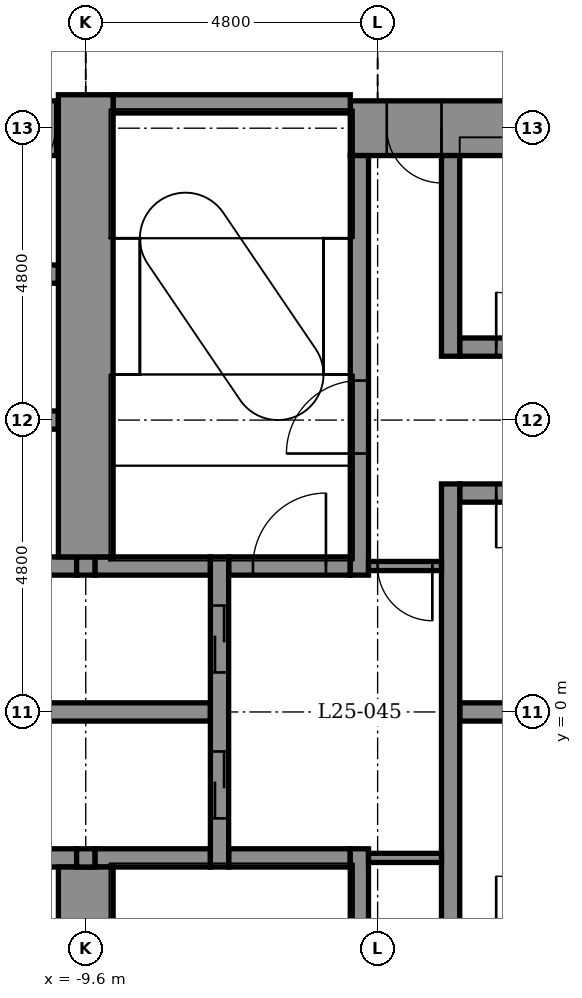
"""IFC4 building model, lengths in metres.
Left out: names, types, materials, properties, quantities, classifications, styles, units other than length and angle.
Written with IfcOpenShell. Run it as: python <this file> out.ifc"""

import sys

from ifc_helpers import new_model, si_unit, direction, frame, frame_2d, origin, place, context, subcontext, project, spatial, rectangle, extrude, element, fill, save


model = new_model("IFC4")
c1 = context("Model", 3, precision=1e-05, world=origin(), true_north=direction((0.0, 1.0)))
c2 = subcontext(c1, "Body", "Model", "MODEL_VIEW")
j1 = project(units=[si_unit("LENGTHUNIT", "METRE"), si_unit("PLANEANGLEUNIT", "RADIAN")], contexts=[c1])
p1 = place(None, origin())
s1 = spatial("IfcSite", under=j1, at=p1, CompositionType="ELEMENT")
p2 = place(p1, origin())
s2 = spatial("IfcBuilding", under=s1, at=p2, CompositionType="ELEMENT")
p3 = place(p2, frame((0.0, 0.0, 127.4)))
s3 = spatial("IfcBuildingStorey", under=s2, at=p3, CompositionType="ELEMENT", Elevation=127.4)
p4 = place(p3, frame((-10.85, -2.4, -0.3), z_axis=(0.0, 0.0, 1.0), x_axis=(1.0, 0.0, 0.0)))
e1 = element("IfcWall", 1, at=p4, inside=s3, PredefinedType="STANDARD", context=c2, shape_type="SweptSolid", body=[
    extrude(rectangle(XDim=1.1, YDim=0.3, at=frame_2d((0.55, 0.0))), origin(), (0.0, 0.0, 1.0), 6.15),
])
p5 = place(p3, frame((-9.45, -2.4, -0.3), z_axis=(0.0, 0.0, 1.0), x_axis=(1.0, 0.0, 0.0)))
e2 = element("IfcWall", 2, at=p5, inside=s3, PredefinedType="STANDARD", context=c2, shape_type="SweptSolid", body=[
    extrude(rectangle(XDim=1.9, YDim=0.3, at=frame_2d((0.95, 0.0))), origin(), (0.0, 0.0, 1.0), 6.15),
])
p6 = place(p3, frame((-7.25, -2.4, -0.3), z_axis=(0.0, 0.0, 1.0), x_axis=(1.0, 0.0, 0.0)))
e3 = element("IfcWall", 3, at=p6, inside=s3, PredefinedType="STANDARD", context=c2, shape_type="SweptSolid", body=[
    extrude(rectangle(XDim=2.0, YDim=0.3, at=frame_2d((1.0, 0.0))), origin(), (0.0, 0.0, 1.0), 6.15),
])
p7 = place(p3, frame((-10.85, 0.0, -0.3), z_axis=(0.0, 0.0, 1.0), x_axis=(1.0, 0.0, 0.0)))
e4 = element("IfcWall", 4, at=p7, inside=s3, PredefinedType="STANDARD", context=c2, shape_type="SweptSolid", body=[
    extrude(rectangle(XDim=3.3, YDim=0.3, at=frame_2d((1.65, 0.0))), origin(), (0.0, 0.0, 1.0), 6.15),
])
p8 = place(p3, frame((-3.45, 0.0, -0.3), z_axis=(0.0, 0.0, 1.0), x_axis=(1.0, 0.0, 0.0)))
e5 = element("IfcWall", 5, at=p8, inside=s3, PredefinedType="STANDARD", context=c2, shape_type="SweptSolid", body=[
    extrude(rectangle(XDim=2.1, YDim=0.3, at=frame_2d((1.05, 0.0))), origin(), (0.0, 0.0, 1.0), 6.15),
])
p9 = place(p3, frame((-10.85, 2.4, -0.3), z_axis=(0.0, 0.0, 1.0), x_axis=(1.0, 0.0, 0.0)))
e6 = element("IfcWall", 6, at=p9, inside=s3, PredefinedType="STANDARD", context=c2, shape_type="SweptSolid", body=[
    extrude(rectangle(XDim=1.1, YDim=0.3, at=frame_2d((0.55, 0.0))), origin(), (0.0, 0.0, 1.0), 6.15),
])
p10 = place(p3, frame((-9.45, 2.4, -0.3), z_axis=(0.0, 0.0, 1.0), x_axis=(1.0, 0.0, 0.0)))
e7 = element("IfcWall", 7, at=p10, inside=s3, PredefinedType="STANDARD", context=c2, shape_type="SweptSolid", body=[
    extrude(rectangle(XDim=1.9, YDim=0.3, at=frame_2d((0.95, 0.0))), origin(), (0.0, 0.0, 1.0), 6.15),
])
p11 = place(p3, frame((-7.25, 2.4, -0.3), z_axis=(0.0, 0.0, 1.0), x_axis=(1.0, 0.0, 0.0)))
e8 = element("IfcWall", 8, at=p11, inside=s3, PredefinedType="STANDARD", context=c2, shape_type="SweptSolid", body=[
    extrude(rectangle(XDim=2.0, YDim=0.3, at=frame_2d((1.0, 0.0))), origin(), (0.0, 0.0, 1.0), 6.15),
])
p12 = place(p11, frame((0.4, 0.0, 0.3)))
e9 = element("IfcOpeningElement", 9, at=p12, cuts=e8, PredefinedType="OPENING", context=c2, shape_type="SweptSolid", body=[
    extrude(rectangle(XDim=1.2, YDim=2.1, at=frame_2d((0.6, 1.05))), frame((0.0, 0.16, 0.0), z_axis=(0.0, -1.0, 0.0), x_axis=(1.0, 0.0, 0.0)), (0.0, 0.0, 1.0), 0.32),
])
p13 = place(p3, frame((-3.45, 3.6, -0.3), z_axis=(0.0, 0.0, 1.0), x_axis=(1.0, 0.0, 0.0)))
e10 = element("IfcWall", 10, at=p13, inside=s3, PredefinedType="STANDARD", context=c2, shape_type="SweptSolid", body=[
    extrude(rectangle(XDim=2.1, YDim=0.3, at=frame_2d((1.05, 0.0))), origin(), (0.0, 0.0, 1.0), 6.15),
])
p14 = place(p13, frame((0.6, 0.0, 0.3)))
e11 = element("IfcOpeningElement", 11, at=p14, cuts=e10, PredefinedType="OPENING", context=c2, shape_type="SweptSolid", body=[
    extrude(rectangle(XDim=0.9, YDim=2.1, at=frame_2d((0.45, 1.05))), frame((0.0, 0.16, 0.0), z_axis=(0.0, -1.0, 0.0), x_axis=(1.0, 0.0, 0.0)), (0.0, 0.0, 1.0), 0.32),
])
p15 = place(p3, frame((-13.95, 4.8, -0.3), z_axis=(0.0, 0.0, 1.0), x_axis=(1.0, 0.0, 0.0)))
e12 = element("IfcWall", 12, at=p15, inside=s3, PredefinedType="STANDARD", context=c2, shape_type="SweptSolid", body=[
    extrude(rectangle(XDim=3.9, YDim=0.3, at=frame_2d((1.95, 0.0))), origin(), (0.0, 0.0, 1.0), 6.15),
])
p16 = place(p3, frame((-3.45, 6.0, -0.3), z_axis=(0.0, 0.0, 1.0), x_axis=(1.0, 0.0, 0.0)))
e13 = element("IfcWall", 13, at=p16, inside=s3, PredefinedType="STANDARD", context=c2, shape_type="SweptSolid", body=[
    extrude(rectangle(XDim=2.1, YDim=0.3, at=frame_2d((1.05, 0.0))), origin(), (0.0, 0.0, 1.0), 6.15),
])
p17 = place(p16, frame((0.6, 0.0, 0.3)))
e14 = element("IfcOpeningElement", 14, at=p17, cuts=e13, PredefinedType="OPENING", context=c2, shape_type="SweptSolid", body=[
    extrude(rectangle(XDim=0.9, YDim=2.1, at=frame_2d((0.45, 1.05))), frame((0.0, 0.16, 0.0), z_axis=(0.0, -1.0, 0.0), x_axis=(1.0, 0.0, 0.0)), (0.0, 0.0, 1.0), 0.32),
])
p18 = place(p3, frame((-13.95, 7.2, -0.3), z_axis=(0.0, 0.0, 1.0), x_axis=(1.0, 0.0, 0.0)))
e15 = element("IfcWall", 15, at=p18, inside=s3, PredefinedType="STANDARD", context=c2, shape_type="SweptSolid", body=[
    extrude(rectangle(XDim=3.9, YDim=0.3, at=frame_2d((1.95, 0.0))), origin(), (0.0, 0.0, 1.0), 6.15),
])
p19 = place(p3, frame((-13.95, 9.6, -0.3), z_axis=(0.0, 0.0, 1.0), x_axis=(1.0, 0.0, 0.0)))
e16 = element("IfcWall", 16, at=p19, inside=s3, PredefinedType="SHEAR", context=c2, shape_type="SweptSolid", body=[
    extrude(rectangle(XDim=3.9, YDim=0.9, at=frame_2d((1.95, 0.0))), origin(), (0.0, 0.0, 1.0), 6.15),
])
p20 = place(p19, frame((0.05, 0.0, 0.3)))
e17 = element("IfcOpeningElement", 17, at=p20, cuts=e16, PredefinedType="OPENING", context=c2, shape_type="SweptSolid", body=[
    extrude(rectangle(XDim=0.9, YDim=2.1, at=frame_2d((0.45, 1.05))), frame((0.0, 0.46, 0.0), z_axis=(0.0, -1.0, 0.0), x_axis=(1.0, 0.0, 0.0)), (0.0, 0.0, 1.0), 0.92),
])
p21 = place(p19, frame((1.5, 0.0, 0.3)))
e18 = element("IfcOpeningElement", 18, at=p21, cuts=e16, PredefinedType="OPENING", context=c2, shape_type="SweptSolid", body=[
    extrude(rectangle(XDim=0.9, YDim=2.1, at=frame_2d((0.45, 1.05))), frame((0.0, 0.46, 0.0), z_axis=(0.0, -1.0, 0.0), x_axis=(1.0, 0.0, 0.0)), (0.0, 0.0, 1.0), 0.92),
])
p22 = place(p19, frame((2.95, 0.0, 0.3)))
e19 = element("IfcOpeningElement", 19, at=p22, cuts=e16, PredefinedType="OPENING", context=c2, shape_type="SweptSolid", body=[
    extrude(rectangle(XDim=0.9, YDim=2.1, at=frame_2d((0.45, 1.05))), frame((0.0, 0.46, 0.0), z_axis=(0.0, -1.0, 0.0), x_axis=(1.0, 0.0, 0.0)), (0.0, 0.0, 1.0), 0.92),
])
p23 = place(p3, frame((-5.25, 9.6, -0.3), z_axis=(0.0, 0.0, 1.0), x_axis=(1.0, 0.0, 0.0)))
e20 = element("IfcWall", 20, at=p23, inside=s3, PredefinedType="SHEAR", context=c2, shape_type="SweptSolid", body=[
    extrude(rectangle(XDim=14.4, YDim=0.9, at=frame_2d((7.2, 0.0))), origin(), (0.0, 0.0, 1.0), 6.15),
])
p24 = place(p23, frame((0.6, 0.0, 0.3)))
e21 = element("IfcOpeningElement", 21, at=p24, cuts=e20, PredefinedType="OPENING", context=c2, shape_type="SweptSolid", body=[
    extrude(rectangle(XDim=0.9, YDim=2.1, at=frame_2d((0.45, 1.05))), frame((0.0, 0.46, 0.0), z_axis=(0.0, -1.0, 0.0), x_axis=(1.0, 0.0, 0.0)), (0.0, 0.0, 1.0), 0.92),
])
p25 = place(p3, frame((-9.15, 10.0, -0.3), z_axis=(0.0, 0.0, 1.0), x_axis=(1.0, 0.0, 0.0)))
e22 = element("IfcWall", 22, at=p25, inside=s3, PredefinedType="STANDARD", context=c2, shape_type="SweptSolid", body=[
    extrude(rectangle(XDim=3.9, YDim=0.3, at=frame_2d((1.95, 0.0))), origin(), (0.0, 0.0, 1.0), 6.15),
])
p26 = place(p3, frame((-9.6, -10.15, -0.3), z_axis=(0.0, 0.0, 1.0), x_axis=(0.0, 1.0, 0.0)))
e23 = element("IfcWall", 23, at=p26, inside=s3, PredefinedType="SHEAR", context=c2, shape_type="SweptSolid", body=[
    extrude(rectangle(XDim=7.6, YDim=0.9, at=frame_2d((3.8, 0.0))), origin(), (0.0, 0.0, 1.0), 6.15),
])
for number, where, z_axis, x_axis in (
    (24, (-9.6, -2.55, -0.3), (0.0, 0.0, 1.0), (0.0, 1.0, 0.0)),
    (25, (-9.6, 2.25, -0.3), (0.0, 0.0, 1.0), (0.0, 1.0, 0.0)),
):
    element("IfcWall", number, at=place(p3, frame(where, z_axis=z_axis, x_axis=x_axis)), inside=s3, PredefinedType="STANDARD", context=c2, shape_type="SweptSolid", body=[
        extrude(rectangle(XDim=0.3, YDim=0.3, at=frame_2d((0.15, 0.0))), origin(), (0.0, 0.0, 1.0), 6.15),
    ])
p27 = place(p3, frame((-9.6, 2.55, -0.3), z_axis=(0.0, 0.0, 1.0), x_axis=(0.0, 1.0, 0.0)))
e26 = element("IfcWall", 26, at=p27, inside=s3, PredefinedType="SHEAR", context=c2, shape_type="SweptSolid", body=[
    extrude(rectangle(XDim=7.6, YDim=0.9, at=frame_2d((3.8, 0.0))), origin(), (0.0, 0.0, 1.0), 6.15),
])
p28 = place(p3, frame((-7.4, -2.55, -0.3), z_axis=(0.0, 0.0, 1.0), x_axis=(0.0, 1.0, 0.0)))
e27 = element("IfcWall", 27, at=p28, inside=s3, PredefinedType="STANDARD", context=c2, shape_type="SweptSolid", body=[
    extrude(rectangle(XDim=5.1, YDim=0.3, at=frame_2d((2.55, 0.0))), origin(), (0.0, 0.0, 1.0), 6.15),
])
p29 = place(p28, frame((0.8, 0.0, 0.3)))
e28 = element("IfcOpeningElement", 28, at=p29, cuts=e27, PredefinedType="OPENING", context=c2, shape_type="SweptSolid", body=[
    extrude(rectangle(XDim=1.1, YDim=2.1, at=frame_2d((0.55, 1.05))), frame((0.0, 0.16, 0.0), z_axis=(0.0, -1.0, 0.0), x_axis=(1.0, 0.0, 0.0)), (0.0, 0.0, 1.0), 0.32),
])
p30 = place(p28, frame((3.2, 0.0, 0.3)))
e29 = element("IfcOpeningElement", 29, at=p30, cuts=e27, PredefinedType="OPENING", context=c2, shape_type="SweptSolid", body=[
    extrude(rectangle(XDim=1.1, YDim=2.1, at=frame_2d((0.55, 1.05))), frame((0.0, 0.16, 0.0), z_axis=(0.0, -1.0, 0.0), x_axis=(1.0, 0.0, 0.0)), (0.0, 0.0, 1.0), 0.32),
])
p31 = place(p3, frame((-5.1, -9.15, -0.3), z_axis=(0.0, 0.0, 1.0), x_axis=(0.0, 1.0, 0.0)))
e30 = element("IfcWall", 30, at=p31, inside=s3, PredefinedType="STANDARD", context=c2, shape_type="SweptSolid", body=[
    extrude(rectangle(XDim=6.9, YDim=0.3, at=frame_2d((3.45, 0.0))), origin(), (0.0, 0.0, 1.0), 6.15),
])
p32 = place(p31, frame((3.7, 0.0, 0.3)))
e31 = element("IfcOpeningElement", 31, at=p32, cuts=e30, PredefinedType="OPENING", context=c2, shape_type="SweptSolid", body=[
    extrude(rectangle(XDim=1.2, YDim=2.1, at=frame_2d((0.6, 1.05))), frame((0.0, 0.16, 0.0), z_axis=(0.0, -1.0, 0.0), x_axis=(1.0, 0.0, 0.0)), (0.0, 0.0, 1.0), 0.32),
])
p33 = place(p3, frame((-5.1, 2.25, -0.3), z_axis=(0.0, 0.0, 1.0), x_axis=(0.0, 1.0, 0.0)))
e32 = element("IfcWall", 32, at=p33, inside=s3, PredefinedType="STANDARD", context=c2, shape_type="SweptSolid", body=[
    extrude(rectangle(XDim=6.9, YDim=0.3, at=frame_2d((3.45, 0.0))), origin(), (0.0, 0.0, 1.0), 6.15),
])
p34 = place(p33, frame((2.0, 0.0, 0.3)))
e33 = element("IfcOpeningElement", 33, at=p34, cuts=e32, PredefinedType="OPENING", context=c2, shape_type="SweptSolid", body=[
    extrude(rectangle(XDim=1.2, YDim=2.1, at=frame_2d((0.6, 1.05))), frame((0.0, 0.16, 0.0), z_axis=(0.0, -1.0, 0.0), x_axis=(1.0, 0.0, 0.0)), (0.0, 0.0, 1.0), 0.32),
])
p35 = place(p3, frame((-3.6, -3.75, -0.3), z_axis=(0.0, 0.0, 1.0), x_axis=(0.0, 1.0, 0.0)))
e34 = element("IfcWall", 34, at=p35, inside=s3, PredefinedType="STANDARD", context=c2, shape_type="SweptSolid", body=[
    extrude(rectangle(XDim=7.5, YDim=0.3, at=frame_2d((3.75, 0.0))), origin(), (0.0, 0.0, 1.0), 6.15),
])
p36 = place(p3, frame((-3.6, 5.85, -0.3), z_axis=(0.0, 0.0, 1.0), x_axis=(0.0, 1.0, 0.0)))
e35 = element("IfcWall", 35, at=p36, inside=s3, PredefinedType="STANDARD", context=c2, shape_type="SweptSolid", body=[
    extrude(rectangle(XDim=3.3, YDim=0.3, at=frame_2d((1.65, 0.0))), origin(), (0.0, 0.0, 1.0), 6.15),
])
p37 = place(p3, frame((-4.95, 2.4, 0.0), z_axis=(0.0, 0.0, 1.0), x_axis=(1.0, 0.0, 0.0)))
e36 = element("IfcWall", 36, at=p37, inside=s3, PredefinedType="PARTITIONING", context=c2, shape_type="SweptSolid", body=[
    extrude(rectangle(XDim=1.2, YDim=0.15, at=frame_2d((0.6, 0.0))), origin(), (0.0, 0.0, 1.0), 5.85),
])
p38 = place(p37, frame((0.15, 0.0, 0.0)))
e37 = element("IfcOpeningElement", 37, at=p38, cuts=e36, PredefinedType="OPENING", context=c2, shape_type="SweptSolid", body=[
    extrude(rectangle(XDim=0.9, YDim=2.1, at=frame_2d((0.45, 1.05))), frame((0.0, 0.085, 0.0), z_axis=(0.0, -1.0, 0.0), x_axis=(1.0, 0.0, 0.0)), (0.0, 0.0, 1.0), 0.17),
])
p39 = place(p3, frame((-4.95, -2.4, 0.0), z_axis=(0.0, 0.0, 1.0), x_axis=(1.0, 0.0, 0.0)))
e38 = element("IfcWall", 38, at=p39, inside=s3, PredefinedType="PARTITIONING", context=c2, shape_type="SweptSolid", body=[
    extrude(rectangle(XDim=1.2, YDim=0.15, at=frame_2d((0.6, 0.0))), origin(), (0.0, 0.0, 1.0), 5.85),
])
p40 = place(p29, origin())
e39 = element("IfcDoor", 39, at=p40, inside=s3, OperationType="DOUBLE_DOOR_SLIDING", PredefinedType="DOOR", context=c2, shape_type="SweptSolid", body=[
    extrude(rectangle(XDim=1.1, YDim=2.1, at=frame_2d((0.55, 1.05))), frame((0.0, 0.025, 0.0), z_axis=(0.0, -1.0, 0.0), x_axis=(1.0, 0.0, 0.0)), (0.0, 0.0, 1.0), 0.05),
])
fill(e28, e39)
p41 = place(p30, origin())
e40 = element("IfcDoor", 40, at=p41, inside=s3, OperationType="DOUBLE_DOOR_SLIDING", PredefinedType="DOOR", context=c2, shape_type="SweptSolid", body=[
    extrude(rectangle(XDim=1.1, YDim=2.1, at=frame_2d((0.55, 1.05))), frame((0.0, 0.025, 0.0), z_axis=(0.0, -1.0, 0.0), x_axis=(1.0, 0.0, 0.0)), (0.0, 0.0, 1.0), 0.05),
])
fill(e29, e40)
p42 = place(p34, origin())
e41 = element("IfcDoor", 41, at=p42, inside=s3, OperationType="SINGLE_SWING_LEFT", PredefinedType="DOOR", context=c2, shape_type="SweptSolid", body=[
    extrude(rectangle(XDim=1.2, YDim=2.1, at=frame_2d((0.6, 1.05))), frame((0.0, 0.025, 0.0), z_axis=(0.0, -1.0, 0.0), x_axis=(1.0, 0.0, 0.0)), (0.0, 0.0, 1.0), 0.05),
])
fill(e33, e41)
p43 = place(p17, origin())
e42 = element("IfcDoor", 42, at=p43, inside=s3, OperationType="SINGLE_SWING_LEFT", PredefinedType="DOOR", context=c2, shape_type="SweptSolid", body=[
    extrude(rectangle(XDim=0.9, YDim=2.1, at=frame_2d((0.45, 1.05))), frame((0.0, 0.025, 0.0), z_axis=(0.0, -1.0, 0.0), x_axis=(1.0, 0.0, 0.0)), (0.0, 0.0, 1.0), 0.05),
])
fill(e14, e42)
p44 = place(p14, frame((0.9, 0.0, 0.0), z_axis=(0.0, 0.0, 1.0), x_axis=(-1.0, 0.0, 0.0)))
e43 = element("IfcDoor", 43, at=p44, inside=s3, OperationType="SINGLE_SWING_LEFT", PredefinedType="DOOR", context=c2, shape_type="SweptSolid", body=[
    extrude(rectangle(XDim=0.9, YDim=2.1, at=frame_2d((0.45, 1.05))), frame((0.0, 0.025, 0.0), z_axis=(0.0, -1.0, 0.0), x_axis=(1.0, 0.0, 0.0)), (0.0, 0.0, 1.0), 0.05),
])
fill(e11, e43)
p45 = place(p22, frame((0.9, 0.0, 0.0), z_axis=(0.0, 0.0, 1.0), x_axis=(-1.0, 0.0, 0.0)))
e44 = element("IfcDoor", 44, at=p45, inside=s3, OperationType="SINGLE_SWING_LEFT", PredefinedType="DOOR", context=c2, shape_type="SweptSolid", body=[
    extrude(rectangle(XDim=0.9, YDim=2.1, at=frame_2d((0.45, 1.05))), frame((0.0, 0.025, 0.0), z_axis=(0.0, -1.0, 0.0), x_axis=(1.0, 0.0, 0.0)), (0.0, 0.0, 1.0), 0.05),
])
fill(e19, e44)
p46 = place(p24, frame((0.9, 0.0, 0.0), z_axis=(0.0, 0.0, 1.0), x_axis=(-1.0, 0.0, 0.0)))
e45 = element("IfcDoor", 45, at=p46, inside=s3, OperationType="SINGLE_SWING_RIGHT", PredefinedType="DOOR", context=c2, shape_type="SweptSolid", body=[
    extrude(rectangle(XDim=0.9, YDim=2.1, at=frame_2d((0.45, 1.05))), frame((0.0, 0.025, 0.0), z_axis=(0.0, -1.0, 0.0), x_axis=(1.0, 0.0, 0.0)), (0.0, 0.0, 1.0), 0.05),
])
fill(e21, e45)
p47 = place(p38, frame((0.9, 0.0, 0.0), z_axis=(0.0, 0.0, 1.0), x_axis=(-1.0, 0.0, 0.0)))
e46 = element("IfcDoor", 46, at=p47, inside=s3, OperationType="SINGLE_SWING_RIGHT", PredefinedType="DOOR", context=c2, shape_type="SweptSolid", body=[
    extrude(rectangle(XDim=0.9, YDim=2.1, at=frame_2d((0.45, 1.05))), frame((0.0, 0.025, 0.0), z_axis=(0.0, -1.0, 0.0), x_axis=(1.0, 0.0, 0.0)), (0.0, 0.0, 1.0), 0.05),
])
fill(e37, e46)
p48 = place(p12, origin())
e47 = element("IfcDoor", 47, at=p48, inside=s3, OperationType="SINGLE_SWING_RIGHT", PredefinedType="DOOR", context=c2, shape_type="SweptSolid", body=[
    extrude(rectangle(XDim=1.2, YDim=2.1, at=frame_2d((0.6, 1.05))), frame((0.0, 0.025, 0.0), z_axis=(0.0, -1.0, 0.0), x_axis=(1.0, 0.0, 0.0)), (0.0, 0.0, 1.0), 0.05),
])
fill(e9, e47)
save(model, sys.argv[1])
